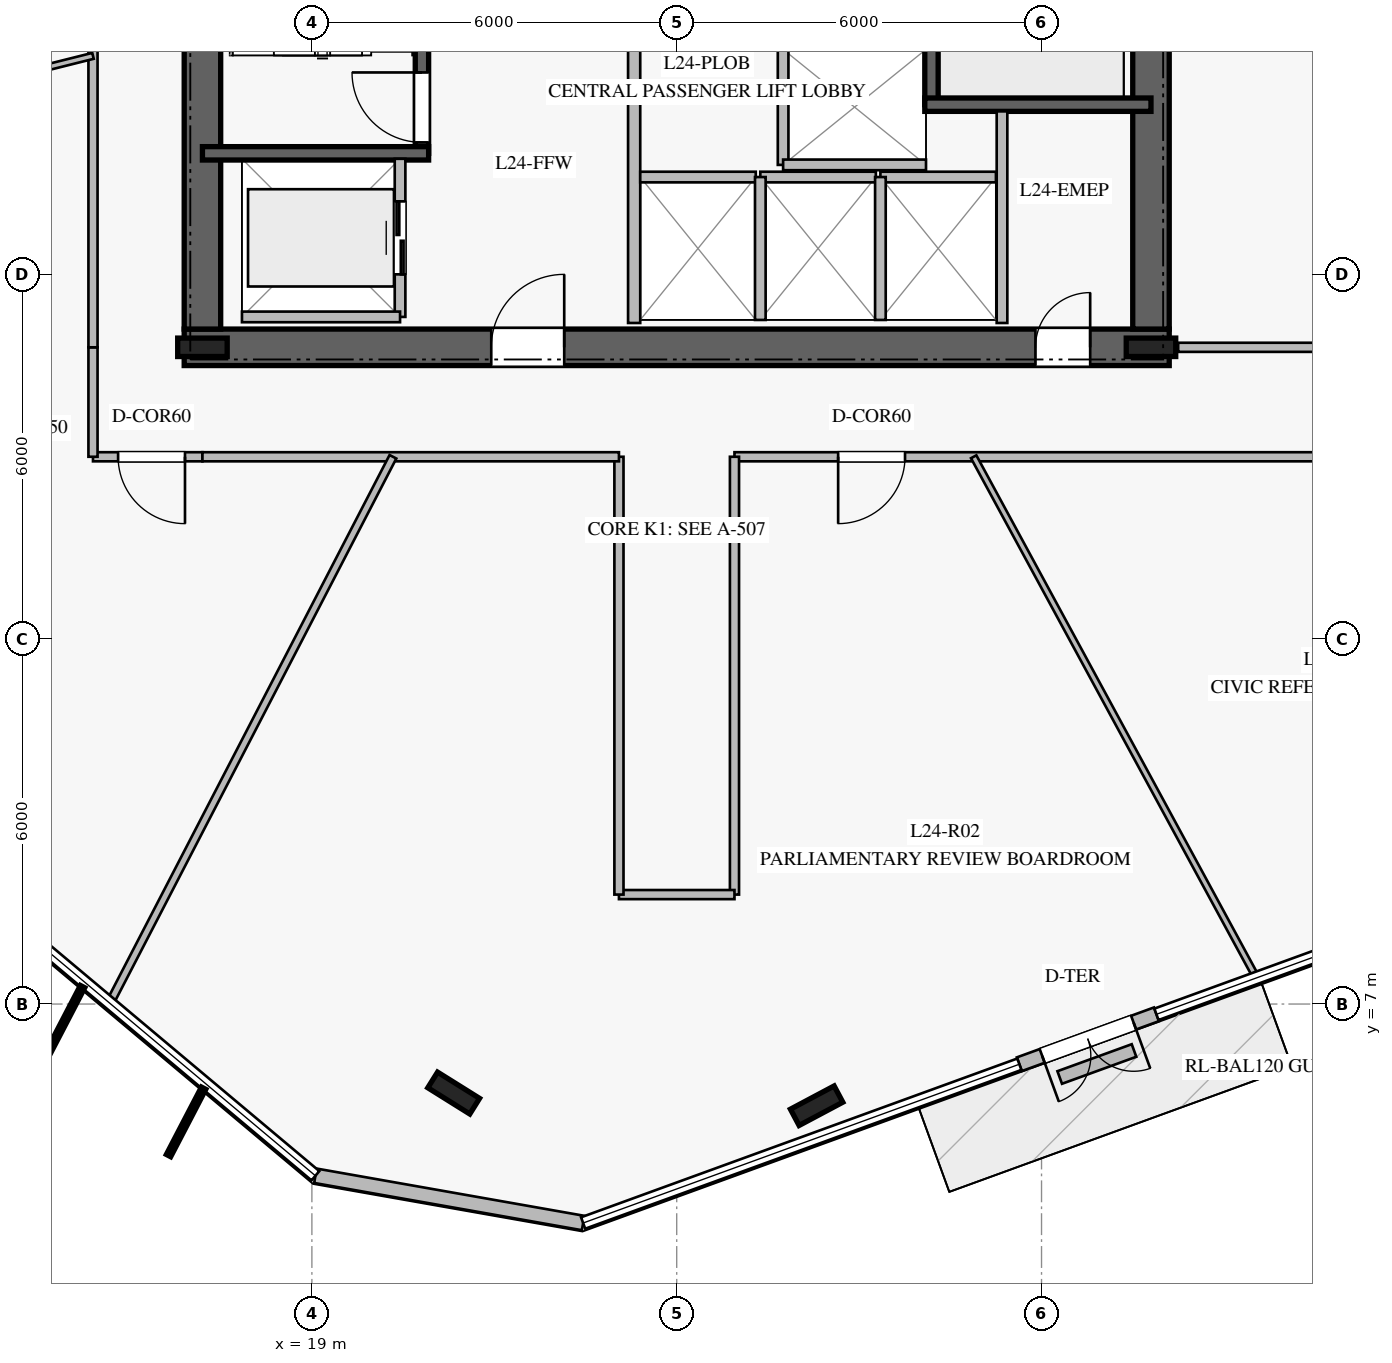
"""IFC4 building model, lengths in metres.
Left out: names, types, materials, properties, quantities, classifications, styles, units other than length and angle.
Written with IfcOpenShell. Run it as: python <this file> out.ifc"""

import sys

from ifc_helpers import new_model, si_unit, direction, frame, frame_2d, origin, origin_2d, place, context, subcontext, project, spatial, rectangle, i_section, extrude, element, fill, save


model = new_model("IFC4")
c1 = context("Model", 3, precision=1e-05, world=origin(), true_north=direction((0.0, 1.0)))
c2 = subcontext(c1, "Body", "Model", "MODEL_VIEW")
j1 = project(units=[si_unit("LENGTHUNIT", "METRE"), si_unit("PLANEANGLEUNIT", "RADIAN")], contexts=[c1])
p1 = place(None, origin())
s1 = spatial("IfcSite", under=j1, at=p1, CompositionType="ELEMENT")
p2 = place(p1, origin())
s2 = spatial("IfcBuilding", under=s1, at=p2, CompositionType="ELEMENT")
p3 = place(p2, frame((0.0, 0.0, 102.4)))
s3 = spatial("IfcBuildingStorey", under=s2, at=p3, CompositionType="ELEMENT", Elevation=102.4)
p4 = place(p3, frame((16.9, 17.8, 0.0), z_axis=(0.0, 0.0, 1.0), x_axis=(1.0, 0.0, 0.0)))
e1 = element("IfcWall", 1, at=p4, inside=s3, PredefinedType="SHEAR", context=c2, shape_type="SweptSolid", body=[
    extrude(rectangle(XDim=16.2, YDim=0.6, at=frame_2d((8.1, 0.0))), origin(), (0.0, 0.0, 1.0), 3.76),
])
p5 = place(p4, frame((5.05, 0.0, 0.0)))
e2 = element("IfcOpeningElement", 2, at=p5, cuts=e1, PredefinedType="OPENING", context=c2, shape_type="SweptSolid", body=[
    extrude(rectangle(XDim=1.2, YDim=2.25, at=frame_2d((0.6, 1.125))), frame((0.0, 0.31, 0.0), z_axis=(0.0, -1.0, 0.0), x_axis=(1.0, 0.0, 0.0)), (0.0, 0.0, 1.0), 0.62),
])
p6 = place(p4, frame((14.0, 0.0, 0.0)))
e3 = element("IfcOpeningElement", 3, at=p6, cuts=e1, PredefinedType="OPENING", context=c2, shape_type="SweptSolid", body=[
    extrude(rectangle(XDim=0.9, YDim=2.1, at=frame_2d((0.45, 1.05))), frame((0.0, 0.31, 0.0), z_axis=(0.0, -1.0, 0.0), x_axis=(1.0, 0.0, 0.0)), (0.0, 0.0, 1.0), 0.62),
])
p7 = place(p3, frame((17.2, 31.9, 0.0), z_axis=(0.0, 0.0, 1.0), x_axis=(0.0, -1.0, 0.0)))
e4 = element("IfcWall", 4, at=p7, inside=s3, PredefinedType="SHEAR", context=c2, shape_type="SweptSolid", body=[
    extrude(rectangle(XDim=13.8, YDim=0.6, at=frame_2d((6.9, 0.0))), origin(), (0.0, 0.0, 1.0), 3.76),
])
p8 = place(p7, frame((2.05, 0.0, 0.0)))
e5 = element("IfcOpeningElement", 5, at=p8, cuts=e4, PredefinedType="OPENING", context=c2, shape_type="SweptSolid", body=[
    extrude(rectangle(XDim=1.5, YDim=2.2, at=frame_2d((0.75, 1.1))), frame((0.0, 0.31, 0.0), z_axis=(0.0, -1.0, 0.0), x_axis=(1.0, 0.0, 0.0)), (0.0, 0.0, 1.0), 0.62),
])
p9 = place(p3, frame((32.8, 18.1, 0.0), z_axis=(0.0, 0.0, 1.0), x_axis=(0.0, 1.0, 0.0)))
e6 = element("IfcWall", 6, at=p9, inside=s3, PredefinedType="SHEAR", context=c2, shape_type="SweptSolid", body=[
    extrude(rectangle(XDim=13.8, YDim=0.6, at=frame_2d((6.9, 0.0))), origin(), (0.0, 0.0, 1.0), 3.76),
])
for number, where, z_axis, x_axis in (
    (7, (17.2, 17.8, 0.0), (0.0, 0.0, 1.0), (1.0, 0.0, 0.0)),
    (8, (32.8, 17.8, 0.0), (0.0, 0.0, 1.0), (1.0, 0.0, 0.0)),
):
    element("IfcColumn", number, at=place(p3, frame(where, z_axis=z_axis, x_axis=x_axis)), inside=s3, PredefinedType="COLUMN", context=c2, shape_type="SweptSolid", body=[
        extrude(i_section(OverallWidth=0.303, OverallDepth=0.814, WebThickness=0.021, FlangeThickness=0.04, at=origin_2d()), origin(), (0.0, 0.0, 1.0), 4.0),
    ])
p10 = place(p3, frame((20.81, 20.99, 0.0), z_axis=(0.0, 0.0, 1.0), x_axis=(0.0, 1.0, 0.0)))
e9 = element("IfcWall", 9, at=p10, inside=s3, PredefinedType="SOLIDWALL", context=c2, shape_type="SweptSolid", body=[
    extrude(rectangle(XDim=7.22, YDim=0.22, at=frame_2d((3.61, 0.0))), origin(), (0.0, 0.0, 1.0), 3.76),
])
p11 = place(p10, frame((0.18, 0.0, 0.0)))
e10 = element("IfcOpeningElement", 10, at=p11, cuts=e9, PredefinedType="OPENING", context=c2, shape_type="SweptSolid", body=[
    extrude(rectangle(XDim=1.15, YDim=2.2, at=frame_2d((0.575, 1.1))), frame((0.0, 0.12, 0.0), z_axis=(0.0, -1.0, 0.0), x_axis=(1.0, 0.0, 0.0)), (0.0, 0.0, 1.0), 0.24),
])
p12 = place(p3, frame((17.2, 20.99, 0.0), z_axis=(0.0, 0.0, 1.0), x_axis=(1.0, 0.0, 0.0)))
e11 = element("IfcWall", 11, at=p12, inside=s3, PredefinedType="SOLIDWALL", context=c2, shape_type="SweptSolid", body=[
    extrude(rectangle(XDim=3.72, YDim=0.22, at=frame_2d((1.86, 0.0))), origin(), (0.0, 0.0, 1.0), 3.76),
])
p13 = place(p3, frame((29.19, 21.79, 0.0), z_axis=(0.0, 0.0, 1.0), x_axis=(0.0, 1.0, 0.0)))
e12 = element("IfcWall", 12, at=p13, inside=s3, PredefinedType="SOLIDWALL", context=c2, shape_type="SweptSolid", body=[
    extrude(rectangle(XDim=7.22, YDim=0.22, at=frame_2d((3.61, 0.0))), origin(), (0.0, 0.0, 1.0), 3.76),
])
p14 = place(p13, frame((5.88, 0.0, 0.0)))
e13 = element("IfcOpeningElement", 13, at=p14, cuts=e12, PredefinedType="OPENING", context=c2, shape_type="SweptSolid", body=[
    extrude(rectangle(XDim=1.15, YDim=2.2, at=frame_2d((0.575, 1.1))), frame((0.0, 0.12, 0.0), z_axis=(0.0, -1.0, 0.0), x_axis=(1.0, 0.0, 0.0)), (0.0, 0.0, 1.0), 0.24),
])
p15 = place(p3, frame((29.08, 21.79, 0.0), z_axis=(0.0, 0.0, 1.0), x_axis=(1.0, 0.0, 0.0)))
e14 = element("IfcWall", 14, at=p15, inside=s3, PredefinedType="SOLIDWALL", context=c2, shape_type="SweptSolid", body=[
    extrude(rectangle(XDim=3.72, YDim=0.22, at=frame_2d((1.86, 0.0))), origin(), (0.0, 0.0, 1.0), 3.76),
])
for number, where, z_axis, x_axis in (
    (15, (21.332, 5.536, 0.0), (0.0, 0.0, 1.0), (-0.848, 0.53, 0.0)),
    (16, (27.301, 5.328, 0.0), (0.0, 0.0, 1.0), (0.883, 0.469, 0.0)),
):
    element("IfcColumn", number, at=place(p3, frame(where, z_axis=z_axis, x_axis=x_axis)), inside=s3, PredefinedType="COLUMN", context=c2, shape_type="SweptSolid", body=[
        extrude(i_section(OverallWidth=0.303, OverallDepth=0.814, WebThickness=0.021, FlangeThickness=0.04, at=origin_2d()), origin(), (0.0, 0.0, 1.0), 4.0),
    ])
p16 = place(p3, frame((19.058, 4.176, 0.0), z_axis=(0.0, 0.0, 1.0), x_axis=(0.984778610825, -0.173813370204, 0.0)))
e17 = element("IfcWall", 17, at=p16, inside=s3, PredefinedType="STANDARD", context=c2, shape_type="SweptSolid", body=[
    extrude(rectangle(XDim=4.471, YDim=0.24, at=frame_2d((2.235, 0.0))), origin(), (0.0, 0.0, 1.0), 3.76),
])
p17 = place(p3, frame((30.635, 6.01, 0.0), z_axis=(0.0, 0.0, 1.0), x_axis=(0.939647786753, 0.342143298706, 0.0)))
e18 = element("IfcWall", 18, at=p17, inside=s3, PredefinedType="STANDARD", context=c2, shape_type="SweptSolid", body=[
    extrude(rectangle(XDim=2.4, YDim=0.24, at=frame_2d((1.2, 0.0))), origin(), (0.0, 0.0, 1.0), 3.76),
])
p18 = place(p17, frame((0.4, 0.0, 0.0)))
e19 = element("IfcOpeningElement", 19, at=p18, cuts=e18, PredefinedType="OPENING", context=c2, shape_type="SweptSolid", body=[
    extrude(rectangle(XDim=1.6, YDim=2.25, at=frame_2d((0.8, 1.125))), frame((0.0, 0.13, 0.0), z_axis=(0.0, -1.0, 0.0), x_axis=(1.0, 0.0, 0.0)), (0.0, 0.0, 1.0), 0.26),
])
p19 = place(p3, frame((31.299, 5.792, 0.0), z_axis=(0.0, 0.0, 1.0), x_axis=(0.93985371871, 0.341577205661, 0.0)))
e20 = element("IfcWall", 20, at=p19, inside=s3, PredefinedType="USERDEFINED", context=c2, shape_type="SweptSolid", body=[
    extrude(rectangle(XDim=1.3, YDim=0.22, at=frame_2d((0.65, 0.0))), origin(), (0.0, 0.0, 1.0), 0.4),
])
p20 = place(p3, frame((24.3, 18.2, 0.0), z_axis=(0.0, 0.0, 1.0), x_axis=(0.0, 1.0, 0.0)))
e21 = element("IfcWall", 21, at=p20, inside=s3, PredefinedType="PARTITIONING", context=c2, shape_type="SweptSolid", body=[
    extrude(rectangle(XDim=5.15, YDim=0.2, at=frame_2d((2.575, 0.0))), origin(), (0.0, 0.0, 1.0), 3.76),
])
p21 = place(p3, frame((30.35, 18.2, 0.0), z_axis=(0.0, 0.0, 1.0), x_axis=(0.0, 1.0, 0.0)))
e22 = element("IfcWall", 22, at=p21, inside=s3, PredefinedType="PARTITIONING", context=c2, shape_type="SweptSolid", body=[
    extrude(rectangle(XDim=3.48, YDim=0.175, at=frame_2d((1.74, 0.0))), origin(), (0.0, 0.0, 1.0), 3.76),
])
p22 = place(p3, frame((24.4, 20.6, 0.0), z_axis=(0.0, 0.0, 1.0), x_axis=(1.0, 0.0, 0.0)))
e23 = element("IfcWall", 23, at=p22, inside=s3, PredefinedType="PARTITIONING", context=c2, shape_type="SweptSolid", body=[
    extrude(rectangle(XDim=1.9, YDim=0.175, at=frame_2d((0.95, 0.0))), origin(), (0.0, 0.0, 1.0), 3.76),
])
p23 = place(p3, frame((26.375, 20.6, 0.0), z_axis=(0.0, 0.0, 1.0), x_axis=(1.0, 0.0, 0.0)))
e24 = element("IfcWall", 24, at=p23, inside=s3, PredefinedType="PARTITIONING", context=c2, shape_type="SweptSolid", body=[
    extrude(rectangle(XDim=1.9, YDim=0.175, at=frame_2d((0.95, 0.0))), origin(), (0.0, 0.0, 1.0), 3.76),
])
p24 = place(p3, frame((26.375, 18.25, 0.0), z_axis=(0.0, 0.0, 1.0), x_axis=(0.0, 1.0, 0.0)))
e25 = element("IfcWall", 25, at=p24, inside=s3, PredefinedType="PARTITIONING", context=c2, shape_type="SweptSolid", body=[
    extrude(rectangle(XDim=2.35, YDim=0.175, at=frame_2d((1.175, 0.0))), origin(), (0.0, 0.0, 1.0), 3.76),
])
p25 = place(p3, frame((28.35, 20.6, 0.0), z_axis=(0.0, 0.0, 1.0), x_axis=(1.0, 0.0, 0.0)))
e26 = element("IfcWall", 26, at=p25, inside=s3, PredefinedType="PARTITIONING", context=c2, shape_type="SweptSolid", body=[
    extrude(rectangle(XDim=1.9, YDim=0.175, at=frame_2d((0.95, 0.0))), origin(), (0.0, 0.0, 1.0), 3.76),
])
p26 = place(p3, frame((28.35, 18.25, 0.0), z_axis=(0.0, 0.0, 1.0), x_axis=(0.0, 1.0, 0.0)))
e27 = element("IfcWall", 27, at=p26, inside=s3, PredefinedType="PARTITIONING", context=c2, shape_type="SweptSolid", body=[
    extrude(rectangle(XDim=2.35, YDim=0.175, at=frame_2d((1.175, 0.0))), origin(), (0.0, 0.0, 1.0), 3.76),
])
p27 = place(p3, frame((26.75, 20.8, 0.0), z_axis=(0.0, 0.0, 1.0), x_axis=(0.0, 1.0, 0.0)))
e28 = element("IfcWall", 28, at=p27, inside=s3, PredefinedType="PARTITIONING", context=c2, shape_type="SweptSolid", body=[
    extrude(rectangle(XDim=1.9, YDim=0.175, at=frame_2d((0.95, 0.0))), origin(), (0.0, 0.0, 1.0), 3.76),
])
p28 = place(p3, frame((26.75, 20.8, 0.0), z_axis=(0.0, 0.0, 1.0), x_axis=(1.0, 0.0, 0.0)))
e29 = element("IfcWall", 29, at=p28, inside=s3, PredefinedType="PARTITIONING", context=c2, shape_type="SweptSolid", body=[
    extrude(rectangle(XDim=2.35, YDim=0.175, at=frame_2d((1.175, 0.0))), origin(), (0.0, 0.0, 1.0), 3.76),
])
p29 = place(p3, frame((20.45, 18.3, 0.0), z_axis=(0.0, 0.0, 1.0), x_axis=(0.0, 1.0, 0.0)))
e30 = element("IfcWall", 30, at=p29, inside=s3, PredefinedType="PARTITIONING", context=c2, shape_type="SweptSolid", body=[
    extrude(rectangle(XDim=2.6, YDim=0.175, at=frame_2d((1.3, 0.0))), origin(), (0.0, 0.0, 1.0), 3.76),
])
p30 = place(p29, frame((0.7, 0.0, 0.0)))
e31 = element("IfcOpeningElement", 31, at=p30, cuts=e30, PredefinedType="OPENING", context=c2, shape_type="SweptSolid", body=[
    extrude(rectangle(XDim=1.2, YDim=2.2, at=frame_2d((0.6, 1.1))), frame((0.0, 0.098, 0.0), z_axis=(0.0, -1.0, 0.0), x_axis=(1.0, 0.0, 0.0)), (0.0, 0.0, 1.0), 0.195),
])
p31 = place(p3, frame((17.85, 18.3, 0.0), z_axis=(0.0, 0.0, 1.0), x_axis=(1.0, 0.0, 0.0)))
e32 = element("IfcWall", 32, at=p31, inside=s3, PredefinedType="PARTITIONING", context=c2, shape_type="SweptSolid", body=[
    extrude(rectangle(XDim=2.6, YDim=0.175, at=frame_2d((1.3, 0.0))), origin(), (0.0, 0.0, 1.0), 3.76),
])
p32 = place(p3, frame((17.2, 16.0, 0.0), z_axis=(0.0, 0.0, 1.0), x_axis=(-1.0, 0.0, 0.0)))
e33 = element("IfcWall", 33, at=p32, inside=s3, PredefinedType="PARTITIONING", context=c2, shape_type="SweptSolid", body=[
    extrude(rectangle(XDim=1.8, YDim=0.15, at=frame_2d((0.9, 0.0))), origin(), (0.0, 0.0, 1.0), 3.36),
])
p33 = place(p32, frame((0.287, 0.0, 0.0)))
e34 = element("IfcOpeningElement", 34, at=p33, cuts=e33, PredefinedType="OPENING", context=c2, shape_type="SweptSolid", body=[
    extrude(rectangle(XDim=1.1, YDim=2.2, at=frame_2d((0.55, 1.1))), frame((0.0, 0.085, 0.0), z_axis=(0.0, -1.0, 0.0), x_axis=(1.0, 0.0, 0.0)), (0.0, 0.0, 1.0), 0.17),
])
p34 = place(p3, frame((15.4, 16.0, 0.0), z_axis=(0.0, 0.0, 1.0), x_axis=(0.0, 1.0, 0.0)))
e35 = element("IfcWall", 35, at=p34, inside=s3, PredefinedType="PARTITIONING", context=c2, shape_type="SweptSolid", body=[
    extrude(rectangle(XDim=1.8, YDim=0.15, at=frame_2d((0.9, 0.0))), origin(), (0.0, 0.0, 1.0), 3.21),
])
p35 = place(p3, frame((15.4, 17.8, 0.0), z_axis=(0.0, 0.0, 1.0), x_axis=(0.0, 1.0, 0.0)))
e36 = element("IfcWall", 36, at=p35, inside=s3, PredefinedType="PARTITIONING", context=c2, shape_type="SweptSolid", body=[
    extrude(rectangle(XDim=6.25, YDim=0.15, at=frame_2d((3.125, 0.0))), origin(), (0.0, 0.0, 1.0), 3.21),
])
p36 = place(p3, frame((33.247, 17.8, 0.0), z_axis=(0.0, 0.0, 1.0), x_axis=(1.0, 0.0, 0.0)))
e37 = element("IfcWall", 37, at=p36, inside=s3, PredefinedType="PARTITIONING", context=c2, shape_type="SweptSolid", body=[
    extrude(rectangle(XDim=7.953, YDim=0.15, at=frame_2d((3.977, 0.0))), origin(), (0.0, 0.0, 1.0), 3.05),
])
p37 = place(p36, frame((3.338, 0.0, 0.0)))
e38 = element("IfcOpeningElement", 38, at=p37, cuts=e37, PredefinedType="OPENING", context=c2, shape_type="SweptSolid", body=[
    extrude(rectangle(XDim=1.1, YDim=2.2, at=frame_2d((0.55, 1.1))), frame((0.0, 0.085, 0.0), z_axis=(0.0, -1.0, 0.0), x_axis=(1.0, 0.0, 0.0)), (0.0, 0.0, 1.0), 0.17),
])
p38 = place(p3, frame((41.087, 16.0, 0.0), z_axis=(0.0, 0.0, 1.0), x_axis=(-1.0, 0.0, 0.0)))
e39 = element("IfcWall", 39, at=p38, inside=s3, PredefinedType="PARTITIONING", context=c2, shape_type="SweptSolid", body=[
    extrude(rectangle(XDim=15.137, YDim=0.15, at=frame_2d((7.568, 0.0))), origin(), (0.0, 0.0, 1.0), 3.21),
])
p39 = place(p38, frame((12.332, 0.0, 0.0)))
e40 = element("IfcOpeningElement", 40, at=p39, cuts=e39, PredefinedType="OPENING", context=c2, shape_type="SweptSolid", body=[
    extrude(rectangle(XDim=1.1, YDim=2.2, at=frame_2d((0.55, 1.1))), frame((0.0, 0.085, 0.0), z_axis=(0.0, -1.0, 0.0), x_axis=(1.0, 0.0, 0.0)), (0.0, 0.0, 1.0), 0.17),
])
p40 = place(p3, frame((25.95, 16.0, 0.0), z_axis=(0.0, 0.0, 1.0), x_axis=(0.0, -1.0, 0.0)))
e41 = element("IfcWall", 41, at=p40, inside=s3, PredefinedType="PARTITIONING", context=c2, shape_type="SweptSolid", body=[
    extrude(rectangle(XDim=7.2, YDim=0.15, at=frame_2d((3.6, 0.0))), origin(), (0.0, 0.0, 1.0), 3.36),
])
p41 = place(p3, frame((25.95, 8.8, 0.0), z_axis=(0.0, 0.0, 1.0), x_axis=(-1.0, 0.0, 0.0)))
e42 = element("IfcWall", 42, at=p41, inside=s3, PredefinedType="PARTITIONING", context=c2, shape_type="SweptSolid", body=[
    extrude(rectangle(XDim=1.9, YDim=0.15, at=frame_2d((0.95, 0.0))), origin(), (0.0, 0.0, 1.0), 3.76),
])
p42 = place(p3, frame((24.05, 8.8, 0.0), z_axis=(0.0, 0.0, 1.0), x_axis=(0.0, 1.0, 0.0)))
e43 = element("IfcWall", 43, at=p42, inside=s3, PredefinedType="PARTITIONING", context=c2, shape_type="SweptSolid", body=[
    extrude(rectangle(XDim=7.2, YDim=0.15, at=frame_2d((3.6, 0.0))), origin(), (0.0, 0.0, 1.0), 3.36),
])
p43 = place(p3, frame((24.05, 16.0, 0.0), z_axis=(0.0, 0.0, 1.0), x_axis=(-1.0, 0.0, 0.0)))
e44 = element("IfcWall", 44, at=p43, inside=s3, PredefinedType="PARTITIONING", context=c2, shape_type="SweptSolid", body=[
    extrude(rectangle(XDim=6.85, YDim=0.15, at=frame_2d((3.425, 0.0))), origin(), (0.0, 0.0, 1.0), 3.21),
])
p44 = place(p3, frame((15.4, 22.593, 0.0), z_axis=(0.0, 0.0, 1.0), x_axis=(-0.969982044696, -0.243176546911, 0.0)))
e45 = element("IfcWall", 45, at=p44, inside=s3, PredefinedType="MOVABLE", context=c2, shape_type="SweptSolid", body=[
    extrude(rectangle(XDim=11.74, YDim=0.1, at=frame_2d((5.87, 0.0))), origin(), (0.0, 0.0, 1.0), 3.05),
])
p45 = place(p3, frame((20.333, 16.0, 0.0), z_axis=(0.0, 0.0, 1.0), x_axis=(-0.46022405939, -0.887802801955, 0.0)))
e46 = element("IfcWall", 46, at=p45, inside=s3, PredefinedType="PARTITIONING", context=c2, shape_type="SweptSolid", body=[
    extrude(rectangle(XDim=10.104, YDim=0.125, at=frame_2d((5.052, 0.0))), origin(), (0.0, 0.0, 1.0), 3.16),
])
p46 = place(p3, frame((29.884, 16.0, 0.0), z_axis=(0.0, 0.0, 1.0), x_axis=(0.477009387534, -0.878898199, 0.0)))
e47 = element("IfcWall", 47, at=p46, inside=s3, PredefinedType="MOVABLE", context=c2, shape_type="SweptSolid", body=[
    extrude(rectangle(XDim=9.734, YDim=0.1, at=frame_2d((4.867, 0.0))), origin(), (0.0, 0.0, 1.0), 3.16),
])
p47 = place(p18, frame((1.6, 0.0, 0.0), z_axis=(0.0, 0.0, 1.0), x_axis=(-1.0, 0.0, 0.0)))
e48 = element("IfcDoor", 48, at=p47, inside=s3, OperationType="DOUBLE_DOOR_SINGLE_SWING", PredefinedType="DOOR", context=c2, shape_type="SweptSolid", body=[
    extrude(rectangle(XDim=1.6, YDim=2.25, at=frame_2d((0.8, 1.125))), frame((0.0, 0.025, 0.0), z_axis=(0.0, -1.0, 0.0), x_axis=(1.0, 0.0, 0.0)), (0.0, 0.0, 1.0), 0.05),
])
fill(e19, e48)
p48 = place(p11, origin())
e49 = element("IfcDoor", 49, at=p48, inside=s3, OperationType="SINGLE_SWING_RIGHT", PredefinedType="DOOR", context=c2, shape_type="SweptSolid", body=[
    extrude(rectangle(XDim=1.15, YDim=2.2, at=frame_2d((0.575, 1.1))), frame((0.0, 0.025, 0.0), z_axis=(0.0, -1.0, 0.0), x_axis=(1.0, 0.0, 0.0)), (0.0, 0.0, 1.0), 0.05),
])
fill(e10, e49)
p49 = place(p5, origin())
e50 = element("IfcDoor", 50, at=p49, inside=s3, OperationType="SINGLE_SWING_RIGHT", PredefinedType="DOOR", context=c2, shape_type="SweptSolid", body=[
    extrude(rectangle(XDim=1.2, YDim=2.25, at=frame_2d((0.6, 1.125))), frame((0.0, 0.025, 0.0), z_axis=(0.0, -1.0, 0.0), x_axis=(1.0, 0.0, 0.0)), (0.0, 0.0, 1.0), 0.05),
])
fill(e2, e50)
p50 = place(p6, origin())
e51 = element("IfcDoor", 51, at=p50, inside=s3, OperationType="SINGLE_SWING_RIGHT", PredefinedType="DOOR", context=c2, shape_type="SweptSolid", body=[
    extrude(rectangle(XDim=0.9, YDim=2.1, at=frame_2d((0.45, 1.05))), frame((0.0, 0.025, 0.0), z_axis=(0.0, -1.0, 0.0), x_axis=(1.0, 0.0, 0.0)), (0.0, 0.0, 1.0), 0.05),
])
fill(e3, e51)
p51 = place(p30, origin())
e52 = element("IfcDoor", 52, at=p51, inside=s3, OperationType="DOUBLE_DOOR_SLIDING", PredefinedType="DOOR", context=c2, shape_type="SweptSolid", body=[
    extrude(rectangle(XDim=1.2, YDim=2.2, at=frame_2d((0.6, 1.1))), frame((0.0, 0.025, 0.0), z_axis=(0.0, -1.0, 0.0), x_axis=(1.0, 0.0, 0.0)), (0.0, 0.0, 1.0), 0.05),
])
fill(e31, e52)
p52 = place(p33, origin())
e53 = element("IfcDoor", 53, at=p52, inside=s3, OperationType="SINGLE_SWING_LEFT", PredefinedType="DOOR", context=c2, shape_type="SweptSolid", body=[
    extrude(rectangle(XDim=1.1, YDim=2.2, at=frame_2d((0.55, 1.1))), frame((0.0, 0.025, 0.0), z_axis=(0.0, -1.0, 0.0), x_axis=(1.0, 0.0, 0.0)), (0.0, 0.0, 1.0), 0.05),
])
fill(e34, e53)
p53 = place(p39, origin())
e54 = element("IfcDoor", 54, at=p53, inside=s3, OperationType="SINGLE_SWING_RIGHT", PredefinedType="DOOR", context=c2, shape_type="SweptSolid", body=[
    extrude(rectangle(XDim=1.1, YDim=2.2, at=frame_2d((0.55, 1.1))), frame((0.0, 0.025, 0.0), z_axis=(0.0, -1.0, 0.0), x_axis=(1.0, 0.0, 0.0)), (0.0, 0.0, 1.0), 0.05),
])
fill(e40, e54)
save(model, sys.argv[1])
